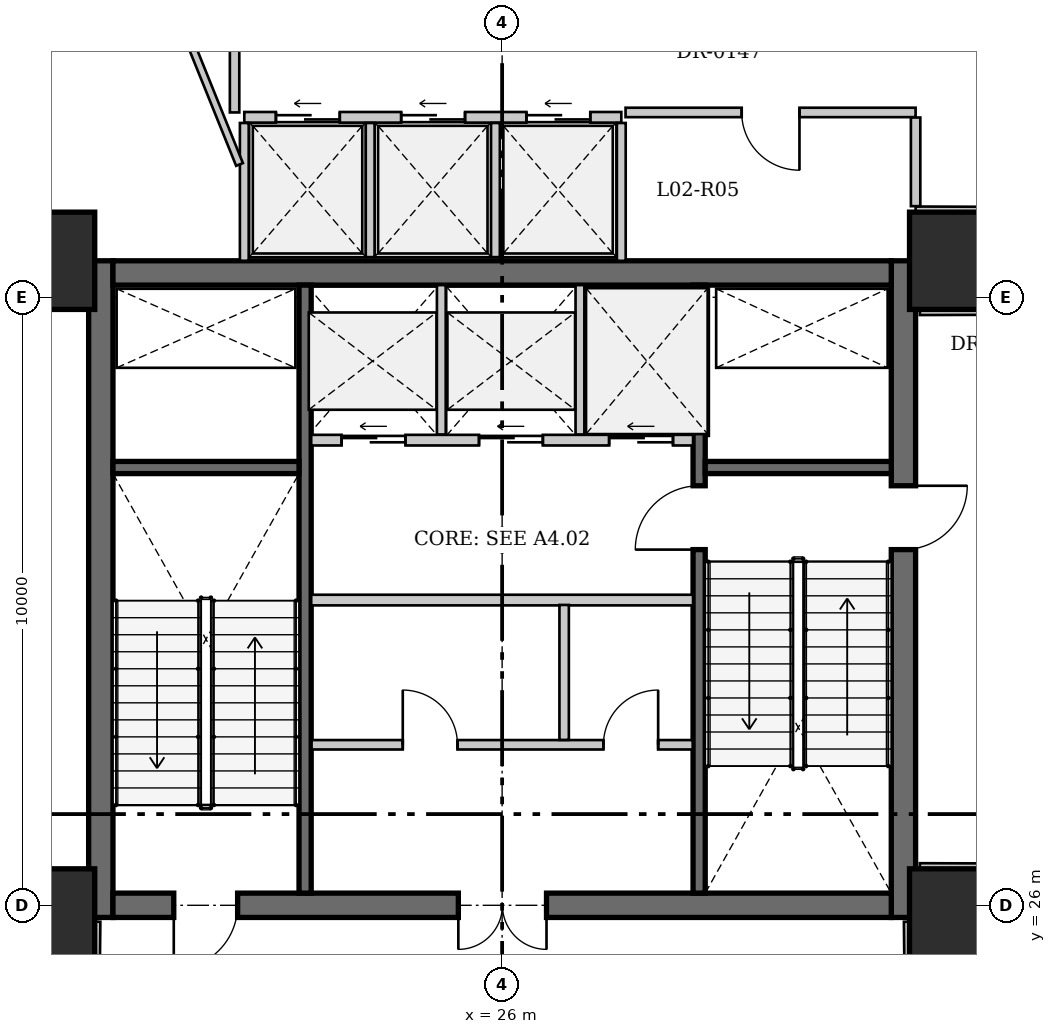
"""IFC4 building model, lengths in metres.
Left out: names, types, materials, properties, quantities, classifications, styles, units other than length and angle.
Written with IfcOpenShell. Run it as: python <this file> out.ifc"""

import sys

from ifc_helpers import new_model, si_unit, direction, frame, frame_2d, origin, origin_2d, place, context, subcontext, project, spatial, rectangle, extrude, source, transform, mapped, element, fill, save


model = new_model("IFC4")
c1 = context("Model", 3, precision=1e-05, world=origin(), true_north=direction((0.0, 1.0)))
c2 = subcontext(c1, "Body", "Model", "MODEL_VIEW")
j1 = project(units=[si_unit("LENGTHUNIT", "METRE"), si_unit("PLANEANGLEUNIT", "RADIAN")], contexts=[c1])
p1 = place(None, origin())
s1 = spatial("IfcSite", under=j1, at=p1, CompositionType="ELEMENT")
p2 = place(p1, origin())
s2 = spatial("IfcBuilding", under=s1, at=p2, CompositionType="ELEMENT")
p3 = place(p2, frame((0.0, 0.0, 9.8)))
s3 = spatial("IfcBuildingStorey", under=s2, at=p3, CompositionType="ELEMENT", Elevation=9.8)
for number, where, z_axis, x_axis in (
    (1, (18.5, 25.8, 0.0), (0.0, 0.0, 1.0), (1.0, 0.0, 0.0)),
    (2, (18.5, 36.6, 0.0), (0.0, 0.0, 1.0), (1.0, 0.0, 0.0)),
    (3, (33.5, 25.8, 0.0), (0.0, 0.0, 1.0), (1.0, 0.0, 0.0)),
    (4, (33.5, 36.6, 0.0), (0.0, 0.0, 1.0), (1.0, 0.0, 0.0)),
):
    element("IfcColumn", number, at=place(p3, frame(where, z_axis=z_axis, x_axis=x_axis)), inside=s3, PredefinedType="COLUMN", context=c2, shape_type="SweptSolid", body=[
        extrude(rectangle(XDim=1.6, YDim=1.6, at=origin_2d()), origin(), (0.0, 0.0, 1.0), 4.3),
    ])
p4 = place(p3, frame((19.4, 25.8, 0.0), z_axis=(0.0, 0.0, 1.0), x_axis=(0.0, 1.0, 0.0)))
e5 = element("IfcWall", 5, at=p4, inside=s3, PredefinedType="SHEAR", context=c2, shape_type="SweptSolid", body=[
    extrude(rectangle(XDim=10.8, YDim=0.4, at=frame_2d((5.4, 0.0))), origin(), (0.0, 0.0, 1.0), 4.6),
])
p5 = place(p3, frame((32.6, 36.6, 0.0), z_axis=(0.0, 0.0, 1.0), x_axis=(0.0, -1.0, 0.0)))
e6 = element("IfcWall", 6, at=p5, inside=s3, PredefinedType="SHEAR", context=c2, shape_type="SweptSolid", body=[
    extrude(rectangle(XDim=10.8, YDim=0.4, at=frame_2d((5.4, 0.0))), origin(), (0.0, 0.0, 1.0), 4.6),
])
p6 = place(p5, frame((3.7, 0.0, 0.0)))
e7 = element("IfcOpeningElement", 7, at=p6, cuts=e6, PredefinedType="OPENING", context=c2, shape_type="SweptSolid", body=[
    extrude(rectangle(XDim=1.05, YDim=2.15, at=frame_2d((0.525, 1.075))), frame((0.0, 0.21, 0.0), z_axis=(0.0, -1.0, 0.0), x_axis=(1.0, 0.0, 0.0)), (0.0, 0.0, 1.0), 0.42),
])
p7 = place(p3, frame((19.6, 36.4, 0.0), z_axis=(0.0, 0.0, 1.0), x_axis=(1.0, 0.0, 0.0)))
e8 = element("IfcWall", 8, at=p7, inside=s3, PredefinedType="SHEAR", context=c2, shape_type="SweptSolid", body=[
    extrude(rectangle(XDim=12.8, YDim=0.4, at=frame_2d((6.4, 0.0))), origin(), (0.0, 0.0, 1.0), 4.6),
])
p8 = place(p3, frame((32.4, 26.0, 0.0), z_axis=(0.0, 0.0, 1.0), x_axis=(-1.0, 0.0, 0.0)))
e9 = element("IfcWall", 9, at=p8, inside=s3, PredefinedType="SHEAR", context=c2, shape_type="SweptSolid", body=[
    extrude(rectangle(XDim=12.8, YDim=0.4, at=frame_2d((6.4, 0.0))), origin(), (0.0, 0.0, 1.0), 4.6),
])
p9 = place(p8, frame((10.75, 0.0, 0.0)))
e10 = element("IfcOpeningElement", 10, at=p9, cuts=e9, PredefinedType="OPENING", context=c2, shape_type="SweptSolid", body=[
    extrude(rectangle(XDim=1.05, YDim=2.15, at=frame_2d((0.525, 1.075))), frame((0.0, 0.21, 0.0), z_axis=(0.0, -1.0, 0.0), x_axis=(1.0, 0.0, 0.0)), (0.0, 0.0, 1.0), 0.42),
])
p10 = place(p8, frame((5.67, 0.0, 0.0)))
e11 = element("IfcOpeningElement", 11, at=p10, cuts=e9, PredefinedType="OPENING", context=c2, shape_type="SweptSolid", body=[
    extrude(rectangle(XDim=1.45, YDim=2.2, at=frame_2d((0.725, 1.1))), frame((0.0, 0.21, 0.0), z_axis=(0.0, -1.0, 0.0), x_axis=(1.0, 0.0, 0.0)), (0.0, 0.0, 1.0), 0.42),
])
p11 = place(p3, frame((22.76, 26.2, 0.0), z_axis=(0.0, 0.0, 1.0), x_axis=(0.0, 1.0, 0.0)))
e12 = element("IfcWall", 12, at=p11, inside=s3, PredefinedType="SHEAR", context=c2, shape_type="SweptSolid", body=[
    extrude(rectangle(XDim=10.0, YDim=0.2, at=frame_2d((5.0, 0.0))), origin(), (0.0, 0.0, 1.0), 4.6),
])
p12 = place(p3, frame((29.24, 26.2, 0.0), z_axis=(0.0, 0.0, 1.0), x_axis=(0.0, 1.0, 0.0)))
e13 = element("IfcWall", 13, at=p12, inside=s3, PredefinedType="SHEAR", context=c2, shape_type="SweptSolid", body=[
    extrude(rectangle(XDim=10.0, YDim=0.2, at=frame_2d((5.0, 0.0))), origin(), (0.0, 0.0, 1.0), 4.6),
])
p13 = place(p12, frame((5.65, 0.0, 0.0)))
e14 = element("IfcOpeningElement", 14, at=p13, cuts=e13, PredefinedType="OPENING", context=c2, shape_type="SweptSolid", body=[
    extrude(rectangle(XDim=1.05, YDim=2.15, at=frame_2d((0.525, 1.075))), frame((0.0, 0.11, 0.0), z_axis=(0.0, -1.0, 0.0), x_axis=(1.0, 0.0, 0.0)), (0.0, 0.0, 1.0), 0.22),
])
for number, where, z_axis, x_axis in (
    (15, (19.6, 33.2, 0.0), (0.0, 0.0, 1.0), (1.0, 0.0, 0.0)),
    (16, (29.34, 33.2, 0.0), (0.0, 0.0, 1.0), (1.0, 0.0, 0.0)),
):
    element("IfcWall", number, at=place(p3, frame(where, z_axis=z_axis, x_axis=x_axis)), inside=s3, PredefinedType="SHEAR", context=c2, shape_type="SweptSolid", body=[
        extrude(rectangle(XDim=3.06, YDim=0.2, at=frame_2d((1.53, 0.0))), origin(), (0.0, 0.0, 1.0), 4.6),
    ])
p14 = place(p3, frame((22.86, 33.65, 0.0), z_axis=(0.0, 0.0, 1.0), x_axis=(1.0, 0.0, 0.0)))
e17 = element("IfcWall", 17, at=p14, inside=s3, PredefinedType="SOLIDWALL", context=c2, shape_type="SweptSolid", body=[
    extrude(rectangle(XDim=6.28, YDim=0.175, at=frame_2d((3.14, 0.0))), origin(), (0.0, 0.0, 1.0), 4.3),
])
p15 = place(p14, frame((0.5, 0.0, 0.0)))
e18 = element("IfcOpeningElement", 18, at=p15, cuts=e17, PredefinedType="OPENING", context=c2, shape_type="SweptSolid", body=[
    extrude(rectangle(XDim=1.05, YDim=2.15, at=frame_2d((0.525, 1.075))), frame((0.0, 0.098, 0.0), z_axis=(0.0, -1.0, 0.0), x_axis=(1.0, 0.0, 0.0)), (0.0, 0.0, 1.0), 0.195),
])
p16 = place(p14, frame((2.76, 0.0, 0.0)))
e19 = element("IfcOpeningElement", 19, at=p16, cuts=e17, PredefinedType="OPENING", context=c2, shape_type="SweptSolid", body=[
    extrude(rectangle(XDim=1.05, YDim=2.15, at=frame_2d((0.525, 1.075))), frame((0.0, 0.098, 0.0), z_axis=(0.0, -1.0, 0.0), x_axis=(1.0, 0.0, 0.0)), (0.0, 0.0, 1.0), 0.195),
])
p17 = place(p14, frame((4.9, 0.0, 0.0)))
e20 = element("IfcOpeningElement", 20, at=p17, cuts=e17, PredefinedType="OPENING", context=c2, shape_type="SweptSolid", body=[
    extrude(rectangle(XDim=1.05, YDim=2.15, at=frame_2d((0.525, 1.075))), frame((0.0, 0.098, 0.0), z_axis=(0.0, -1.0, 0.0), x_axis=(1.0, 0.0, 0.0)), (0.0, 0.0, 1.0), 0.195),
])
for number, where, z_axis, x_axis in (
    (21, (25.0, 33.743, 0.0), (0.0, 0.0, 1.0), (0.0, 1.0, 0.0)),
    (22, (27.28, 33.743, 0.0), (0.0, 0.0, 1.0), (0.0, 1.0, 0.0)),
):
    element("IfcWall", number, at=place(p3, frame(where, z_axis=z_axis, x_axis=x_axis)), inside=s3, PredefinedType="SOLIDWALL", context=c2, shape_type="SweptSolid", body=[
        extrude(rectangle(XDim=2.457, YDim=0.145, at=frame_2d((1.228, 0.0))), origin(), (0.0, 0.0, 1.0), 4.3),
    ])
p18 = place(p3, frame((22.86, 31.02, 0.0), z_axis=(0.0, 0.0, 1.0), x_axis=(1.0, 0.0, 0.0)))
e23 = element("IfcWall", 23, at=p18, inside=s3, PredefinedType="SOLIDWALL", context=c2, shape_type="SweptSolid", body=[
    extrude(rectangle(XDim=6.28, YDim=0.175, at=frame_2d((3.14, 0.0))), origin(), (0.0, 0.0, 1.0), 4.3),
])
p19 = place(p3, frame((22.866, 28.64, 0.0), z_axis=(0.0, 0.0, 1.0), x_axis=(1.0, 0.0, 0.0)))
e24 = element("IfcWall", 24, at=p19, inside=s3, PredefinedType="PARTITIONING", context=c2, shape_type="SweptSolid", body=[
    extrude(rectangle(XDim=6.268, YDim=0.155, at=frame_2d((3.134, 0.0))), origin(), (0.0, 0.0, 1.0), 4.3),
])
p20 = place(p19, frame((1.5, 0.0, 0.0)))
e25 = element("IfcOpeningElement", 25, at=p20, cuts=e24, PredefinedType="OPENING", context=c2, shape_type="SweptSolid", body=[
    extrude(rectangle(XDim=0.9, YDim=2.1, at=frame_2d((0.45, 1.05))), frame((0.0, 0.087, 0.0), z_axis=(0.0, -1.0, 0.0), x_axis=(1.0, 0.0, 0.0)), (0.0, 0.0, 1.0), 0.175),
])
p21 = place(p19, frame((4.8, 0.0, 0.0)))
e26 = element("IfcOpeningElement", 26, at=p21, cuts=e24, PredefinedType="OPENING", context=c2, shape_type="SweptSolid", body=[
    extrude(rectangle(XDim=0.9, YDim=2.1, at=frame_2d((0.45, 1.05))), frame((0.0, 0.087, 0.0), z_axis=(0.0, -1.0, 0.0), x_axis=(1.0, 0.0, 0.0)), (0.0, 0.0, 1.0), 0.175),
])
p22 = place(p3, frame((27.02, 28.72, 0.0), z_axis=(0.0, 0.0, 1.0), x_axis=(0.0, 1.0, 0.0)))
e27 = element("IfcWall", 27, at=p22, inside=s3, PredefinedType="PARTITIONING", context=c2, shape_type="SweptSolid", body=[
    extrude(rectangle(XDim=2.22, YDim=0.155, at=frame_2d((1.11, 0.0))), origin(), (0.0, 0.0, 1.0), 4.3),
])
p23 = place(p3, frame((21.76, 38.96, 0.0), z_axis=(0.0, 0.0, 1.0), x_axis=(1.0, 0.0, 0.0)))
e28 = element("IfcWall", 28, at=p23, inside=s3, PredefinedType="SOLIDWALL", context=c2, shape_type="SweptSolid", body=[
    extrude(rectangle(XDim=6.2, YDim=0.175, at=frame_2d((3.1, 0.0))), origin(), (0.0, 0.0, 1.0), 4.3),
])
p24 = place(p23, frame((0.52, 0.0, 0.0)))
e29 = element("IfcOpeningElement", 29, at=p24, cuts=e28, PredefinedType="OPENING", context=c2, shape_type="SweptSolid", body=[
    extrude(rectangle(XDim=1.05, YDim=2.15, at=frame_2d((0.525, 1.075))), frame((0.0, 0.098, 0.0), z_axis=(0.0, -1.0, 0.0), x_axis=(1.0, 0.0, 0.0)), (0.0, 0.0, 1.0), 0.195),
])
p25 = place(p23, frame((2.58, 0.0, 0.0)))
e30 = element("IfcOpeningElement", 30, at=p25, cuts=e28, PredefinedType="OPENING", context=c2, shape_type="SweptSolid", body=[
    extrude(rectangle(XDim=1.05, YDim=2.15, at=frame_2d((0.525, 1.075))), frame((0.0, 0.098, 0.0), z_axis=(0.0, -1.0, 0.0), x_axis=(1.0, 0.0, 0.0)), (0.0, 0.0, 1.0), 0.195),
])
p26 = place(p23, frame((4.64, 0.0, 0.0)))
e31 = element("IfcOpeningElement", 31, at=p26, cuts=e28, PredefinedType="OPENING", context=c2, shape_type="SweptSolid", body=[
    extrude(rectangle(XDim=1.05, YDim=2.15, at=frame_2d((0.525, 1.075))), frame((0.0, 0.098, 0.0), z_axis=(0.0, -1.0, 0.0), x_axis=(1.0, 0.0, 0.0)), (0.0, 0.0, 1.0), 0.195),
])
for number, where, z_axis, x_axis in (
    (32, (21.76, 36.6, 0.0), (0.0, 0.0, 1.0), (0.0, 1.0, 0.0)),
    (33, (27.96, 36.6, 0.0), (0.0, 0.0, 1.0), (0.0, 1.0, 0.0)),
):
    element("IfcWall", number, at=place(p3, frame(where, z_axis=z_axis, x_axis=x_axis)), inside=s3, PredefinedType="SOLIDWALL", context=c2, shape_type="SweptSolid", body=[
        extrude(rectangle(XDim=2.266, YDim=0.145, at=frame_2d((1.133, 0.0))), origin(), (0.0, 0.0, 1.0), 4.3),
    ])
for number, where, z_axis, x_axis in (
    (34, (23.83, 36.66, 0.0), (0.0, 0.0, 1.0), (0.0, 1.0, 0.0)),
    (35, (25.89, 36.66, 0.0), (0.0, 0.0, 1.0), (0.0, 1.0, 0.0)),
):
    element("IfcWall", number, at=place(p3, frame(where, z_axis=z_axis, x_axis=x_axis)), inside=s3, PredefinedType="SOLIDWALL", context=c2, shape_type="SweptSolid", body=[
        extrude(rectangle(XDim=2.207, YDim=0.145, at=frame_2d((1.103, 0.0))), origin(), (0.0, 0.0, 1.0), 4.3),
    ])
p27 = place(p3, frame((32.8, 39.04, 0.0), z_axis=(0.0, 0.0, 1.0), x_axis=(-1.0, 0.0, 0.0)))
e36 = element("IfcWall", 36, at=p27, inside=s3, PredefinedType="PARTITIONING", context=c2, shape_type="SweptSolid", body=[
    extrude(rectangle(XDim=4.77, YDim=0.155, at=frame_2d((2.385, 0.0))), origin(), (0.0, 0.0, 1.0), 4.3),
])
p28 = place(p27, frame((1.91, 0.0, 0.0)))
e37 = element("IfcOpeningElement", 37, at=p28, cuts=e36, PredefinedType="OPENING", context=c2, shape_type="SweptSolid", body=[
    extrude(rectangle(XDim=0.95, YDim=2.15, at=frame_2d((0.475, 1.075))), frame((0.0, 0.087, 0.0), z_axis=(0.0, -1.0, 0.0), x_axis=(1.0, 0.0, 0.0)), (0.0, 0.0, 1.0), 0.175),
])
p29 = place(p3, frame((19.308, 25.07, 0.0), z_axis=(0.0, 0.0, 1.0), x_axis=(0.010362137944, 0.999946311607, 0.0)))
e38 = element("IfcWall", 38, at=p29, inside=s3, PredefinedType="PARTITIONING", context=c2, shape_type="SweptSolid", body=[
    extrude(rectangle(XDim=0.66, YDim=0.155, at=frame_2d((0.33, 0.0))), origin(), (0.0, 0.0, 1.0), 4.3),
])
p30 = place(p3, frame((32.685, 25.73, 0.0), z_axis=(0.0, 0.0, 1.0), x_axis=(0.010511902743, -0.999944748424, 0.0)))
e39 = element("IfcWall", 39, at=p30, inside=s3, PredefinedType="PARTITIONING", context=c2, shape_type="SweptSolid", body=[
    extrude(rectangle(XDim=0.743, YDim=0.155, at=frame_2d((0.372, 0.0))), origin(), (0.0, 0.0, 1.0), 4.3),
])
p31 = place(p3, frame((34.227, 26.611, 0.0), z_axis=(0.0, 0.0, 1.0), x_axis=(-0.999995856473, 0.002878721429, 0.0)))
e40 = element("IfcWall", 40, at=p31, inside=s3, PredefinedType="PARTITIONING", context=c2, shape_type="SweptSolid", body=[
    extrude(rectangle(XDim=1.357, YDim=0.155, at=frame_2d((0.678, 0.0))), origin(), (0.0, 0.0, 1.0), 4.3),
])
p32 = place(p3, frame((32.87, 35.785, 0.0), z_axis=(0.0, 0.0, 1.0), x_axis=(0.99999584892, 0.002881343971, 0.0)))
e41 = element("IfcWall", 41, at=p32, inside=s3, PredefinedType="PARTITIONING", context=c2, shape_type="SweptSolid", body=[
    extrude(rectangle(XDim=1.44, YDim=0.155, at=frame_2d((0.72, 0.0))), origin(), (0.0, 0.0, 1.0), 4.3),
])
p33 = place(p3, frame((34.228, 37.41, 0.0), z_axis=(0.0, 0.0, 1.0), x_axis=(-0.999993554729, 0.003590334185, 0.0)))
e42 = element("IfcWall", 42, at=p33, inside=s3, PredefinedType="PARTITIONING", context=c2, shape_type="SweptSolid", body=[
    extrude(rectangle(XDim=1.428, YDim=0.155, at=frame_2d((0.714, 0.0))), origin(), (0.0, 0.0, 1.0), 4.3),
])
p34 = place(p3, frame((32.8, 37.499, 0.0), z_axis=(0.0, 0.0, 1.0), x_axis=(0.0, 1.0, 0.0)))
e43 = element("IfcWall", 43, at=p34, inside=s3, PredefinedType="PARTITIONING", context=c2, shape_type="SweptSolid", body=[
    extrude(rectangle(XDim=1.458, YDim=0.155, at=frame_2d((0.729, 0.0))), origin(), (0.0, 0.0, 1.0), 4.3),
])
p35 = place(p3, frame((21.6, 39.04, 0.0), z_axis=(0.0, 0.0, 1.0), x_axis=(0.0, 1.0, 0.0)))
e44 = element("IfcWall", 44, at=p35, inside=s3, PredefinedType="PARTITIONING", context=c2, shape_type="SweptSolid", body=[
    extrude(rectangle(XDim=1.876, YDim=0.155, at=frame_2d((0.938, 0.0))), origin(), (0.0, 0.0, 1.0), 4.3),
])
p36 = place(p3, frame((21.681, 38.184, 0.0), z_axis=(0.0, 0.0, 1.0), x_axis=(-0.374369058087, 0.927279789679, 0.0)))
e45 = element("IfcWall", 45, at=p36, inside=s3, PredefinedType="PARTITIONING", context=c2, shape_type="SweptSolid", body=[
    extrude(rectangle(XDim=8.418, YDim=0.12, at=frame_2d((4.209, 0.0))), origin(), (0.0, 0.0, 1.0), 4.3),
])
m1 = source(origin(), c2, "Body", "SweptSolid", [
    extrude(rectangle(XDim=1.05, YDim=2.15, at=frame_2d((0.525, 1.075))), frame((0.0, 0.025, 0.0), z_axis=(0.0, -1.0, 0.0), x_axis=(1.0, 0.0, 0.0)), (0.0, 0.0, 1.0), 0.05),
])
p37 = place(p9, origin())
e46 = element("IfcDoor", 46, at=p37, inside=s3, OperationType="SINGLE_SWING_RIGHT", PredefinedType="DOOR", context=c2, shape_type="MappedRepresentation", body=[
    mapped(m1, transform((0.0, 0.0, 0.0), x_axis=(1.0, 0.0, 0.0), y_axis=(0.0, 1.0, 0.0), z_axis=(0.0, 0.0, 1.0), scale=1.0)),
])
fill(e10, e46)
m2 = source(origin(), c2, "Body", "SweptSolid", [
    extrude(rectangle(XDim=1.45, YDim=2.2, at=frame_2d((0.725, 1.1))), frame((0.0, 0.025, 0.0), z_axis=(0.0, -1.0, 0.0), x_axis=(1.0, 0.0, 0.0)), (0.0, 0.0, 1.0), 0.05),
])
p38 = place(p10, origin())
e47 = element("IfcDoor", 47, at=p38, inside=s3, OperationType="DOUBLE_DOOR_SINGLE_SWING", PredefinedType="DOOR", context=c2, shape_type="MappedRepresentation", body=[
    mapped(m2, transform((0.0, 0.0, 0.0), x_axis=(1.0, 0.0, 0.0), y_axis=(0.0, 1.0, 0.0), z_axis=(0.0, 0.0, 1.0), scale=1.0)),
])
fill(e11, e47)
p39 = place(p6, origin())
e48 = element("IfcDoor", 48, at=p39, inside=s3, OperationType="SINGLE_SWING_LEFT", PredefinedType="DOOR", context=c2, shape_type="MappedRepresentation", body=[
    mapped(m1, transform((0.0, 0.0, 0.0), x_axis=(1.0, 0.0, 0.0), y_axis=(0.0, 1.0, 0.0), z_axis=(0.0, 0.0, 1.0), scale=1.0)),
])
fill(e7, e48)
p40 = place(p13, origin())
e49 = element("IfcDoor", 49, at=p40, inside=s3, OperationType="SINGLE_SWING_LEFT", PredefinedType="DOOR", context=c2, shape_type="MappedRepresentation", body=[
    mapped(m1, transform((0.0, 0.0, 0.0), x_axis=(1.0, 0.0, 0.0), y_axis=(0.0, 1.0, 0.0), z_axis=(0.0, 0.0, 1.0), scale=1.0)),
])
fill(e14, e49)
m3 = source(origin(), c2, "Body", "SweptSolid", [
    extrude(rectangle(XDim=1.05, YDim=2.15, at=frame_2d((0.525, 1.075))), frame((0.0, 0.025, 0.0), z_axis=(0.0, -1.0, 0.0), x_axis=(1.0, 0.0, 0.0)), (0.0, 0.0, 1.0), 0.05),
])
p41 = place(p15, origin())
e50 = element("IfcDoor", 50, at=p41, inside=s3, OperationType="SLIDING_TO_LEFT", PredefinedType="DOOR", context=c2, shape_type="MappedRepresentation", body=[
    mapped(m3, transform((0.0, 0.0, 0.0), x_axis=(1.0, 0.0, 0.0), y_axis=(0.0, 1.0, 0.0), z_axis=(0.0, 0.0, 1.0), scale=1.0)),
])
fill(e18, e50)
p42 = place(p16, origin())
e51 = element("IfcDoor", 51, at=p42, inside=s3, OperationType="SLIDING_TO_LEFT", PredefinedType="DOOR", context=c2, shape_type="MappedRepresentation", body=[
    mapped(m3, transform((0.0, 0.0, 0.0), x_axis=(1.0, 0.0, 0.0), y_axis=(0.0, 1.0, 0.0), z_axis=(0.0, 0.0, 1.0), scale=1.0)),
])
fill(e19, e51)
p43 = place(p17, origin())
e52 = element("IfcDoor", 52, at=p43, inside=s3, OperationType="SLIDING_TO_LEFT", PredefinedType="DOOR", context=c2, shape_type="MappedRepresentation", body=[
    mapped(m3, transform((0.0, 0.0, 0.0), x_axis=(1.0, 0.0, 0.0), y_axis=(0.0, 1.0, 0.0), z_axis=(0.0, 0.0, 1.0), scale=1.0)),
])
fill(e20, e52)
m4 = source(origin(), c2, "Body", "SweptSolid", [
    extrude(rectangle(XDim=0.9, YDim=2.1, at=frame_2d((0.45, 1.05))), frame((0.0, 0.025, 0.0), z_axis=(0.0, -1.0, 0.0), x_axis=(1.0, 0.0, 0.0)), (0.0, 0.0, 1.0), 0.05),
])
p44 = place(p20, origin())
e53 = element("IfcDoor", 53, at=p44, inside=s3, OperationType="SINGLE_SWING_LEFT", PredefinedType="DOOR", context=c2, shape_type="MappedRepresentation", body=[
    mapped(m4, transform((0.0, 0.0, 0.0), x_axis=(1.0, 0.0, 0.0), y_axis=(0.0, 1.0, 0.0), z_axis=(0.0, 0.0, 1.0), scale=1.0)),
])
fill(e25, e53)
p45 = place(p21, origin())
e54 = element("IfcDoor", 54, at=p45, inside=s3, OperationType="SINGLE_SWING_RIGHT", PredefinedType="DOOR", context=c2, shape_type="MappedRepresentation", body=[
    mapped(m4, transform((0.0, 0.0, 0.0), x_axis=(1.0, 0.0, 0.0), y_axis=(0.0, 1.0, 0.0), z_axis=(0.0, 0.0, 1.0), scale=1.0)),
])
fill(e26, e54)
p46 = place(p24, origin())
e55 = element("IfcDoor", 55, at=p46, inside=s3, OperationType="SLIDING_TO_LEFT", PredefinedType="DOOR", context=c2, shape_type="MappedRepresentation", body=[
    mapped(m3, transform((0.0, 0.0, 0.0), x_axis=(1.0, 0.0, 0.0), y_axis=(0.0, 1.0, 0.0), z_axis=(0.0, 0.0, 1.0), scale=1.0)),
])
fill(e29, e55)
p47 = place(p25, origin())
e56 = element("IfcDoor", 56, at=p47, inside=s3, OperationType="SLIDING_TO_LEFT", PredefinedType="DOOR", context=c2, shape_type="MappedRepresentation", body=[
    mapped(m3, transform((0.0, 0.0, 0.0), x_axis=(1.0, 0.0, 0.0), y_axis=(0.0, 1.0, 0.0), z_axis=(0.0, 0.0, 1.0), scale=1.0)),
])
fill(e30, e56)
p48 = place(p26, origin())
e57 = element("IfcDoor", 57, at=p48, inside=s3, OperationType="SLIDING_TO_LEFT", PredefinedType="DOOR", context=c2, shape_type="MappedRepresentation", body=[
    mapped(m3, transform((0.0, 0.0, 0.0), x_axis=(1.0, 0.0, 0.0), y_axis=(0.0, 1.0, 0.0), z_axis=(0.0, 0.0, 1.0), scale=1.0)),
])
fill(e31, e57)
m5 = source(origin(), c2, "Body", "SweptSolid", [
    extrude(rectangle(XDim=0.95, YDim=2.15, at=frame_2d((0.475, 1.075))), frame((0.0, 0.025, 0.0), z_axis=(0.0, -1.0, 0.0), x_axis=(1.0, 0.0, 0.0)), (0.0, 0.0, 1.0), 0.05),
])
p49 = place(p28, origin())
e58 = element("IfcDoor", 58, at=p49, inside=s3, OperationType="SINGLE_SWING_LEFT", PredefinedType="DOOR", context=c2, shape_type="MappedRepresentation", body=[
    mapped(m5, transform((0.0, 0.0, 0.0), x_axis=(1.0, 0.0, 0.0), y_axis=(0.0, 1.0, 0.0), z_axis=(0.0, 0.0, 1.0), scale=1.0)),
])
fill(e37, e58)
save(model, sys.argv[1])
